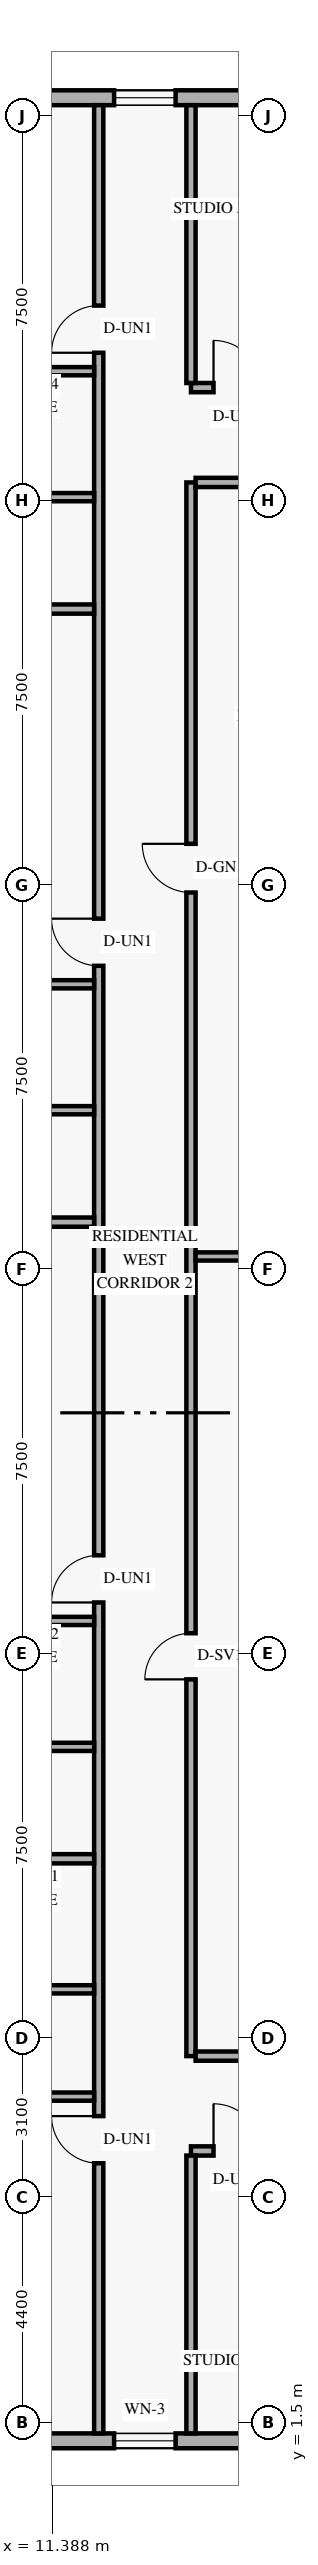
"""IFC4 building model, lengths in metres.
Left out: names, types, materials, properties, quantities, classifications, styles, units other than length and angle.
Written with IfcOpenShell. Run it as: python <this file> out.ifc"""

import sys

from ifc_helpers import new_model, si_unit, direction, frame, frame_2d, origin, place, context, subcontext, project, spatial, rectangle, extrude, element, fill, save


model = new_model("IFC4")
c1 = context("Model", 3, precision=1e-05, world=origin(), true_north=direction((0.0, 1.0)))
c2 = subcontext(c1, "Body", "Model", "MODEL_VIEW")
j1 = project(units=[si_unit("LENGTHUNIT", "METRE"), si_unit("PLANEANGLEUNIT", "RADIAN")], contexts=[c1])
p1 = place(None, origin())
s1 = spatial("IfcSite", under=j1, at=p1, CompositionType="ELEMENT")
p2 = place(p1, origin())
s2 = spatial("IfcBuilding", under=s1, at=p2, CompositionType="ELEMENT")
p3 = place(p2, frame((0.0, 0.0, 49.2)))
s3 = spatial("IfcBuildingStorey", under=s2, at=p3, CompositionType="ELEMENT", Elevation=49.2)
p4 = place(p3, frame((5.42, 1.145, 0.0), z_axis=(0.0, 0.0, 1.0), x_axis=(1.0, 0.0, 0.0)))
e1 = element("IfcWall", 1, at=p4, inside=s3, PredefinedType="SOLIDWALL", context=c2, shape_type="SweptSolid", body=[
    extrude(rectangle(XDim=39.56, YDim=0.29, at=frame_2d((19.78, 0.0))), origin(), (0.0, 0.0, 1.0), 3.36),
])
p5 = place(p4, frame((2.615, 0.0, 0.85)))
e2 = element("IfcOpeningElement", 2, at=p5, cuts=e1, PredefinedType="OPENING", context=c2, shape_type="SweptSolid", body=[
    extrude(rectangle(XDim=1.65, YDim=1.6, at=frame_2d((0.825, 0.8))), frame((0.0, 0.155, 0.0), z_axis=(0.0, -1.0, 0.0), x_axis=(1.0, 0.0, 0.0)), (0.0, 0.0, 1.0), 0.31),
])
p6 = place(p4, frame((7.18, 0.0, 0.85)))
e3 = element("IfcOpeningElement", 3, at=p6, cuts=e1, PredefinedType="OPENING", context=c2, shape_type="SweptSolid", body=[
    extrude(rectangle(XDim=1.2, YDim=1.5, at=frame_2d((0.6, 0.75))), frame((0.0, 0.155, 0.0), z_axis=(0.0, -1.0, 0.0), x_axis=(1.0, 0.0, 0.0)), (0.0, 0.0, 1.0), 0.31),
])
p7 = place(p4, frame((11.906, 0.0, 0.85)))
e4 = element("IfcOpeningElement", 4, at=p7, cuts=e1, PredefinedType="OPENING", context=c2, shape_type="SweptSolid", body=[
    extrude(rectangle(XDim=1.65, YDim=1.6, at=frame_2d((0.825, 0.8))), frame((0.0, 0.155, 0.0), z_axis=(0.0, -1.0, 0.0), x_axis=(1.0, 0.0, 0.0)), (0.0, 0.0, 1.0), 0.31),
])
p8 = place(p4, frame((18.515, 0.0, 0.85)))
e5 = element("IfcOpeningElement", 5, at=p8, cuts=e1, PredefinedType="OPENING", context=c2, shape_type="SweptSolid", body=[
    extrude(rectangle(XDim=1.65, YDim=1.6, at=frame_2d((0.825, 0.8))), frame((0.0, 0.155, 0.0), z_axis=(0.0, -1.0, 0.0), x_axis=(1.0, 0.0, 0.0)), (0.0, 0.0, 1.0), 0.31),
])
p9 = place(p4, frame((25.124, 0.0, 0.85)))
e6 = element("IfcOpeningElement", 6, at=p9, cuts=e1, PredefinedType="OPENING", context=c2, shape_type="SweptSolid", body=[
    extrude(rectangle(XDim=1.65, YDim=1.6, at=frame_2d((0.825, 0.8))), frame((0.0, 0.155, 0.0), z_axis=(0.0, -1.0, 0.0), x_axis=(1.0, 0.0, 0.0)), (0.0, 0.0, 1.0), 0.31),
])
p10 = place(p4, frame((30.465, 0.0, 0.85)))
e7 = element("IfcOpeningElement", 7, at=p10, cuts=e1, PredefinedType="OPENING", context=c2, shape_type="SweptSolid", body=[
    extrude(rectangle(XDim=1.2, YDim=1.5, at=frame_2d((0.6, 0.75))), frame((0.0, 0.155, 0.0), z_axis=(0.0, -1.0, 0.0), x_axis=(1.0, 0.0, 0.0)), (0.0, 0.0, 1.0), 0.31),
])
p11 = place(p4, frame((32.613, 0.0, 0.85)))
e8 = element("IfcOpeningElement", 8, at=p11, cuts=e1, PredefinedType="OPENING", context=c2, shape_type="SweptSolid", body=[
    extrude(rectangle(XDim=1.65, YDim=1.6, at=frame_2d((0.825, 0.8))), frame((0.0, 0.155, 0.0), z_axis=(0.0, -1.0, 0.0), x_axis=(1.0, 0.0, 0.0)), (0.0, 0.0, 1.0), 0.31),
])
p12 = place(p4, frame((36.328, 0.0, 0.85)))
e9 = element("IfcOpeningElement", 9, at=p12, cuts=e1, PredefinedType="OPENING", context=c2, shape_type="SweptSolid", body=[
    extrude(rectangle(XDim=1.65, YDim=1.6, at=frame_2d((0.825, 0.8))), frame((0.0, 0.155, 0.0), z_axis=(0.0, -1.0, 0.0), x_axis=(1.0, 0.0, 0.0)), (0.0, 0.0, 1.0), 0.31),
])
p13 = place(p3, frame((44.98, 46.855, 0.0), z_axis=(0.0, 0.0, 1.0), x_axis=(-1.0, 0.0, 0.0)))
e10 = element("IfcWall", 10, at=p13, inside=s3, PredefinedType="SOLIDWALL", context=c2, shape_type="SweptSolid", body=[
    extrude(rectangle(XDim=39.56, YDim=0.29, at=frame_2d((19.78, 0.0))), origin(), (0.0, 0.0, 1.0), 3.36),
])
p14 = place(p13, frame((35.295, 0.0, 0.85)))
e11 = element("IfcOpeningElement", 11, at=p14, cuts=e10, PredefinedType="OPENING", context=c2, shape_type="SweptSolid", body=[
    extrude(rectangle(XDim=1.65, YDim=1.6, at=frame_2d((0.825, 0.8))), frame((0.0, 0.155, 0.0), z_axis=(0.0, -1.0, 0.0), x_axis=(1.0, 0.0, 0.0)), (0.0, 0.0, 1.0), 0.31),
])
p15 = place(p13, frame((31.18, 0.0, 0.85)))
e12 = element("IfcOpeningElement", 12, at=p15, cuts=e10, PredefinedType="OPENING", context=c2, shape_type="SweptSolid", body=[
    extrude(rectangle(XDim=1.2, YDim=1.5, at=frame_2d((0.6, 0.75))), frame((0.0, 0.155, 0.0), z_axis=(0.0, -1.0, 0.0), x_axis=(1.0, 0.0, 0.0)), (0.0, 0.0, 1.0), 0.31),
])
p16 = place(p13, frame((25.684, 0.0, 0.85)))
e13 = element("IfcOpeningElement", 13, at=p16, cuts=e10, PredefinedType="OPENING", context=c2, shape_type="SweptSolid", body=[
    extrude(rectangle(XDim=1.65, YDim=1.6, at=frame_2d((0.825, 0.8))), frame((0.0, 0.155, 0.0), z_axis=(0.0, -1.0, 0.0), x_axis=(1.0, 0.0, 0.0)), (0.0, 0.0, 1.0), 0.31),
])
p17 = place(p13, frame((18.649, 0.0, 0.85)))
e14 = element("IfcOpeningElement", 14, at=p17, cuts=e10, PredefinedType="OPENING", context=c2, shape_type="SweptSolid", body=[
    extrude(rectangle(XDim=1.65, YDim=1.6, at=frame_2d((0.825, 0.8))), frame((0.0, 0.155, 0.0), z_axis=(0.0, -1.0, 0.0), x_axis=(1.0, 0.0, 0.0)), (0.0, 0.0, 1.0), 0.31),
])
p18 = place(p13, frame((12.359, 0.0, 0.85)))
e15 = element("IfcOpeningElement", 15, at=p18, cuts=e10, PredefinedType="OPENING", context=c2, shape_type="SweptSolid", body=[
    extrude(rectangle(XDim=1.65, YDim=1.6, at=frame_2d((0.825, 0.8))), frame((0.0, 0.155, 0.0), z_axis=(0.0, -1.0, 0.0), x_axis=(1.0, 0.0, 0.0)), (0.0, 0.0, 1.0), 0.31),
])
p19 = place(p13, frame((7.895, 0.0, 0.85)))
e16 = element("IfcOpeningElement", 16, at=p19, cuts=e10, PredefinedType="OPENING", context=c2, shape_type="SweptSolid", body=[
    extrude(rectangle(XDim=1.2, YDim=1.5, at=frame_2d((0.6, 0.75))), frame((0.0, 0.155, 0.0), z_axis=(0.0, -1.0, 0.0), x_axis=(1.0, 0.0, 0.0)), (0.0, 0.0, 1.0), 0.31),
])
p20 = place(p13, frame((5.183, 0.0, 0.85)))
e17 = element("IfcOpeningElement", 17, at=p20, cuts=e10, PredefinedType="OPENING", context=c2, shape_type="SweptSolid", body=[
    extrude(rectangle(XDim=1.65, YDim=1.6, at=frame_2d((0.825, 0.8))), frame((0.0, 0.155, 0.0), z_axis=(0.0, -1.0, 0.0), x_axis=(1.0, 0.0, 0.0)), (0.0, 0.0, 1.0), 0.31),
])
p21 = place(p13, frame((1.468, 0.0, 0.85)))
e18 = element("IfcOpeningElement", 18, at=p21, cuts=e10, PredefinedType="OPENING", context=c2, shape_type="SweptSolid", body=[
    extrude(rectangle(XDim=1.65, YDim=1.6, at=frame_2d((0.825, 0.8))), frame((0.0, 0.155, 0.0), z_axis=(0.0, -1.0, 0.0), x_axis=(1.0, 0.0, 0.0)), (0.0, 0.0, 1.0), 0.31),
])
p22 = place(p3, frame((14.1, 6.8, 0.0), z_axis=(0.0, 0.0, 1.0), x_axis=(1.0, 0.0, 0.0)))
e19 = element("IfcWall", 19, at=p22, inside=s3, PredefinedType="STANDARD", context=c2, shape_type="SweptSolid", body=[
    extrude(rectangle(XDim=21.32, YDim=0.18, at=frame_2d((10.66, 0.0))), origin(), (0.0, 0.0, 1.0), 2.649),
])
p23 = place(p22, frame((0.44, 0.0, 0.0)))
e20 = element("IfcOpeningElement", 20, at=p23, cuts=e19, PredefinedType="OPENING", context=c2, shape_type="SweptSolid", body=[
    extrude(rectangle(XDim=0.92, YDim=2.15, at=frame_2d((0.46, 1.075))), frame((0.0, 0.1, 0.0), z_axis=(0.0, -1.0, 0.0), x_axis=(1.0, 0.0, 0.0)), (0.0, 0.0, 1.0), 0.2),
])
p24 = place(p22, frame((8.582, 0.0, 0.0)))
e21 = element("IfcOpeningElement", 21, at=p24, cuts=e19, PredefinedType="OPENING", context=c2, shape_type="SweptSolid", body=[
    extrude(rectangle(XDim=0.95, YDim=2.15, at=frame_2d((0.475, 1.075))), frame((0.0, 0.1, 0.0), z_axis=(0.0, -1.0, 0.0), x_axis=(1.0, 0.0, 0.0)), (0.0, 0.0, 1.0), 0.2),
])
p25 = place(p22, frame((13.658, 0.0, 0.0)))
e22 = element("IfcOpeningElement", 22, at=p25, cuts=e19, PredefinedType="OPENING", context=c2, shape_type="SweptSolid", body=[
    extrude(rectangle(XDim=0.92, YDim=2.15, at=frame_2d((0.46, 1.075))), frame((0.0, 0.1, 0.0), z_axis=(0.0, -1.0, 0.0), x_axis=(1.0, 0.0, 0.0)), (0.0, 0.0, 1.0), 0.2),
])
p26 = place(p3, frame((14.1, 41.2, 0.0), z_axis=(0.0, 0.0, 1.0), x_axis=(1.0, 0.0, 0.0)))
e23 = element("IfcWall", 23, at=p26, inside=s3, PredefinedType="STANDARD", context=c2, shape_type="SweptSolid", body=[
    extrude(rectangle(XDim=21.32, YDim=0.18, at=frame_2d((10.66, 0.0))), origin(), (0.0, 0.0, 1.0), 2.649),
])
p27 = place(p26, frame((0.44, 0.0, 0.0)))
e24 = element("IfcOpeningElement", 24, at=p27, cuts=e23, PredefinedType="OPENING", context=c2, shape_type="SweptSolid", body=[
    extrude(rectangle(XDim=0.92, YDim=2.15, at=frame_2d((0.46, 1.075))), frame((0.0, 0.1, 0.0), z_axis=(0.0, -1.0, 0.0), x_axis=(1.0, 0.0, 0.0)), (0.0, 0.0, 1.0), 0.2),
])
p28 = place(p26, frame((10.631, 0.0, 0.0)))
e25 = element("IfcOpeningElement", 25, at=p28, cuts=e23, PredefinedType="OPENING", context=c2, shape_type="SweptSolid", body=[
    extrude(rectangle(XDim=0.95, YDim=2.15, at=frame_2d((0.475, 1.075))), frame((0.0, 0.1, 0.0), z_axis=(0.0, -1.0, 0.0), x_axis=(1.0, 0.0, 0.0)), (0.0, 0.0, 1.0), 0.2),
])
p29 = place(p26, frame((14.511, 0.0, 0.0)))
e26 = element("IfcOpeningElement", 26, at=p29, cuts=e23, PredefinedType="OPENING", context=c2, shape_type="SweptSolid", body=[
    extrude(rectangle(XDim=0.92, YDim=2.15, at=frame_2d((0.46, 1.075))), frame((0.0, 0.1, 0.0), z_axis=(0.0, -1.0, 0.0), x_axis=(1.0, 0.0, 0.0)), (0.0, 0.0, 1.0), 0.2),
])
p30 = place(p3, frame((12.3, 1.29, 0.0), z_axis=(0.0, 0.0, 1.0), x_axis=(0.0, 1.0, 0.0)))
e27 = element("IfcWall", 27, at=p30, inside=s3, PredefinedType="STANDARD", context=c2, shape_type="SweptSolid", body=[
    extrude(rectangle(XDim=45.42, YDim=0.18, at=frame_2d((22.71, 0.0))), origin(), (0.0, 0.0, 1.0), 2.649),
])
p31 = place(p30, frame((5.27, 0.0, 0.0)))
e28 = element("IfcOpeningElement", 28, at=p31, cuts=e27, PredefinedType="OPENING", context=c2, shape_type="SweptSolid", body=[
    extrude(rectangle(XDim=0.92, YDim=2.15, at=frame_2d((0.46, 1.075))), frame((0.0, 0.1, 0.0), z_axis=(0.0, -1.0, 0.0), x_axis=(1.0, 0.0, 0.0)), (0.0, 0.0, 1.0), 0.2),
])
p32 = place(p30, frame((16.21, 0.0, 0.0)))
e29 = element("IfcOpeningElement", 29, at=p32, cuts=e27, PredefinedType="OPENING", context=c2, shape_type="SweptSolid", body=[
    extrude(rectangle(XDim=0.92, YDim=2.15, at=frame_2d((0.46, 1.075))), frame((0.0, 0.1, 0.0), z_axis=(0.0, -1.0, 0.0), x_axis=(1.0, 0.0, 0.0)), (0.0, 0.0, 1.0), 0.2),
])
p33 = place(p30, frame((28.63, 0.0, 0.0)))
e30 = element("IfcOpeningElement", 30, at=p33, cuts=e27, PredefinedType="OPENING", context=c2, shape_type="SweptSolid", body=[
    extrude(rectangle(XDim=0.92, YDim=2.15, at=frame_2d((0.46, 1.075))), frame((0.0, 0.1, 0.0), z_axis=(0.0, -1.0, 0.0), x_axis=(1.0, 0.0, 0.0)), (0.0, 0.0, 1.0), 0.2),
])
p34 = place(p30, frame((40.59, 0.0, 0.0)))
e31 = element("IfcOpeningElement", 31, at=p34, cuts=e27, PredefinedType="OPENING", context=c2, shape_type="SweptSolid", body=[
    extrude(rectangle(XDim=0.92, YDim=2.15, at=frame_2d((0.46, 1.075))), frame((0.0, 0.1, 0.0), z_axis=(0.0, -1.0, 0.0), x_axis=(1.0, 0.0, 0.0)), (0.0, 0.0, 1.0), 0.2),
])
p35 = place(p3, frame((14.1, 8.65, 0.0), z_axis=(0.0, 0.0, 1.0), x_axis=(0.0, 1.0, 0.0)))
e32 = element("IfcWall", 32, at=p35, inside=s3, PredefinedType="STANDARD", context=c2, shape_type="SweptSolid", body=[
    extrude(rectangle(XDim=30.7, YDim=0.18, at=frame_2d((15.35, 0.0))), origin(), (0.0, 0.0, 1.0), 2.649),
])
p36 = place(p35, frame((7.35, 0.0, 0.0)))
e33 = element("IfcOpeningElement", 33, at=p36, cuts=e32, PredefinedType="OPENING", context=c2, shape_type="SweptSolid", body=[
    extrude(rectangle(XDim=0.9, YDim=2.1, at=frame_2d((0.45, 1.05))), frame((0.0, 0.1, 0.0), z_axis=(0.0, -1.0, 0.0), x_axis=(1.0, 0.0, 0.0)), (0.0, 0.0, 1.0), 0.2),
])
p37 = place(p35, frame((22.7, 0.0, 0.0)))
e34 = element("IfcOpeningElement", 34, at=p37, cuts=e32, PredefinedType="OPENING", context=c2, shape_type="SweptSolid", body=[
    extrude(rectangle(XDim=0.95, YDim=2.15, at=frame_2d((0.475, 1.075))), frame((0.0, 0.1, 0.0), z_axis=(0.0, -1.0, 0.0), x_axis=(1.0, 0.0, 0.0)), (0.0, 0.0, 1.0), 0.2),
])
for number, where, z_axis, x_axis in (
    (35, (14.19, 8.65, 0.0), (0.0, 0.0, 1.0), (1.0, 0.0, 0.0)),
    (36, (14.19, 39.35, 0.0), (0.0, 0.0, 1.0), (1.0, 0.0, 0.0)),
):
    element("IfcWall", number, at=place(p3, frame(where, z_axis=z_axis, x_axis=x_axis)), inside=s3, PredefinedType="STANDARD", context=c2, shape_type="SweptSolid", body=[
        extrude(rectangle(XDim=7.37, YDim=0.18, at=frame_2d((3.685, 0.0))), origin(), (0.0, 0.0, 1.0), 2.649),
    ])
for number, where, z_axis, x_axis in (
    (37, (14.1, 1.29, 0.0), (0.0, 0.0, 1.0), (0.0, 1.0, 0.0)),
    (38, (14.1, 41.29, 0.0), (0.0, 0.0, 1.0), (0.0, 1.0, 0.0)),
):
    element("IfcWall", number, at=place(p3, frame(where, z_axis=z_axis, x_axis=x_axis)), inside=s3, PredefinedType="PARTITIONING", context=c2, shape_type="SweptSolid", body=[
        extrude(rectangle(XDim=5.42, YDim=0.18, at=frame_2d((2.71, 0.0))), origin(), (0.0, 0.0, 1.0), 2.809),
    ])
p38 = place(p3, frame((8.43, 7.86, 0.0), z_axis=(0.0, 0.0, 1.0), x_axis=(1.0, 0.0, 0.0)))
e39 = element("IfcWall", 39, at=p38, inside=s3, PredefinedType="PLUMBINGWALL", context=c2, shape_type="SweptSolid", body=[
    extrude(rectangle(XDim=3.78, YDim=0.16, at=frame_2d((1.89, 0.0))), origin(), (0.0, 0.0, 1.0), 2.649),
])
p39 = place(p3, frame((8.59, 9.953, 0.0), z_axis=(0.0, 0.0, 1.0), x_axis=(1.0, 0.0, 0.0)))
e40 = element("IfcWall", 40, at=p39, inside=s3, PredefinedType="PLUMBINGWALL", context=c2, shape_type="SweptSolid", body=[
    extrude(rectangle(XDim=3.62, YDim=0.16, at=frame_2d((1.81, 0.0))), origin(), (0.0, 0.0, 1.0), 2.649),
])
p40 = place(p3, frame((2.09, 12.5, 0.0), z_axis=(0.0, 0.0, 1.0), x_axis=(1.0, 0.0, 0.0)))
e41 = element("IfcWall", 41, at=p40, inside=s3, PredefinedType="PARTITIONING", context=c2, shape_type="SweptSolid", body=[
    extrude(rectangle(XDim=10.12, YDim=0.18, at=frame_2d((5.06, 0.0))), origin(), (0.0, 0.0, 1.0), 2.649),
])
p41 = place(p3, frame((8.43, 17.14, 0.0), z_axis=(0.0, 0.0, 1.0), x_axis=(1.0, 0.0, 0.0)))
e42 = element("IfcWall", 42, at=p41, inside=s3, PredefinedType="PLUMBINGWALL", context=c2, shape_type="SweptSolid", body=[
    extrude(rectangle(XDim=3.78, YDim=0.16, at=frame_2d((1.89, 0.0))), origin(), (0.0, 0.0, 1.0), 2.649),
])
p42 = place(p3, frame((8.59, 14.683, 0.0), z_axis=(0.0, 0.0, 1.0), x_axis=(1.0, 0.0, 0.0)))
e43 = element("IfcWall", 43, at=p42, inside=s3, PredefinedType="PLUMBINGWALL", context=c2, shape_type="SweptSolid", body=[
    extrude(rectangle(XDim=3.62, YDim=0.16, at=frame_2d((1.81, 0.0))), origin(), (0.0, 0.0, 1.0), 2.649),
])
p43 = place(p3, frame((2.09, 24.92, 0.0), z_axis=(0.0, 0.0, 1.0), x_axis=(1.0, 0.0, 0.0)))
e44 = element("IfcWall", 44, at=p43, inside=s3, PredefinedType="PARTITIONING", context=c2, shape_type="SweptSolid", body=[
    extrude(rectangle(XDim=10.12, YDim=0.18, at=frame_2d((5.06, 0.0))), origin(), (0.0, 0.0, 1.0), 2.649),
])
p44 = place(p3, frame((9.528, 29.56, 0.0), z_axis=(0.0, 0.0, 1.0), x_axis=(1.0, 0.0, 0.0)))
e45 = element("IfcWall", 45, at=p44, inside=s3, PredefinedType="PLUMBINGWALL", context=c2, shape_type="SweptSolid", body=[
    extrude(rectangle(XDim=2.682, YDim=0.16, at=frame_2d((1.341, 0.0))), origin(), (0.0, 0.0, 1.0), 2.649),
])
p45 = place(p3, frame((9.688, 27.103, 0.0), z_axis=(0.0, 0.0, 1.0), x_axis=(1.0, 0.0, 0.0)))
e46 = element("IfcWall", 46, at=p45, inside=s3, PredefinedType="PLUMBINGWALL", context=c2, shape_type="SweptSolid", body=[
    extrude(rectangle(XDim=2.522, YDim=0.16, at=frame_2d((1.261, 0.0))), origin(), (0.0, 0.0, 1.0), 2.649),
])
p46 = place(p3, frame((2.09, 36.88, 0.0), z_axis=(0.0, 0.0, 1.0), x_axis=(1.0, 0.0, 0.0)))
e47 = element("IfcWall", 47, at=p46, inside=s3, PredefinedType="PARTITIONING", context=c2, shape_type="SweptSolid", body=[
    extrude(rectangle(XDim=10.12, YDim=0.18, at=frame_2d((5.06, 0.0))), origin(), (0.0, 0.0, 1.0), 2.649),
])
p47 = place(p3, frame((8.43, 41.52, 0.0), z_axis=(0.0, 0.0, 1.0), x_axis=(1.0, 0.0, 0.0)))
e48 = element("IfcWall", 48, at=p47, inside=s3, PredefinedType="PLUMBINGWALL", context=c2, shape_type="SweptSolid", body=[
    extrude(rectangle(XDim=3.78, YDim=0.16, at=frame_2d((1.89, 0.0))), origin(), (0.0, 0.0, 1.0), 3.36),
])
p48 = place(p3, frame((8.59, 39.063, 0.0), z_axis=(0.0, 0.0, 1.0), x_axis=(1.0, 0.0, 0.0)))
e49 = element("IfcWall", 49, at=p48, inside=s3, PredefinedType="PLUMBINGWALL", context=c2, shape_type="SweptSolid", body=[
    extrude(rectangle(XDim=3.62, YDim=0.16, at=frame_2d((1.81, 0.0))), origin(), (0.0, 0.0, 1.0), 3.36),
])
p49 = place(p3, frame((14.19, 24.25, 0.0), z_axis=(0.0, 0.0, 1.0), x_axis=(1.0, 0.0, 0.0)))
e50 = element("IfcWall", 50, at=p49, inside=s3, PredefinedType="PARTITIONING", context=c2, shape_type="SweptSolid", body=[
    extrude(rectangle(XDim=7.37, YDim=0.16, at=frame_2d((3.685, 0.0))), origin(), (0.0, 0.0, 1.0), 2.649),
])
p50 = place(p6, origin())
e51 = element("IfcWindow", 51, at=p50, inside=s3, PartitioningType="SINGLE_PANEL", PredefinedType="WINDOW", context=c2, shape_type="SweptSolid", body=[
    extrude(rectangle(XDim=1.2, YDim=1.5, at=frame_2d((0.6, 0.75))), frame((0.0, 0.03, 0.0), z_axis=(0.0, -1.0, 0.0), x_axis=(1.0, 0.0, 0.0)), (0.0, 0.0, 1.0), 0.06),
])
fill(e3, e51)
p51 = place(p15, origin())
e52 = element("IfcWindow", 52, at=p51, inside=s3, PartitioningType="SINGLE_PANEL", PredefinedType="WINDOW", context=c2, shape_type="SweptSolid", body=[
    extrude(rectangle(XDim=1.2, YDim=1.5, at=frame_2d((0.6, 0.75))), frame((0.0, 0.03, 0.0), z_axis=(0.0, -1.0, 0.0), x_axis=(1.0, 0.0, 0.0)), (0.0, 0.0, 1.0), 0.06),
])
fill(e12, e52)
p52 = place(p31, origin())
e53 = element("IfcDoor", 53, at=p52, inside=s3, OperationType="SINGLE_SWING_RIGHT", PredefinedType="DOOR", context=c2, shape_type="SweptSolid", body=[
    extrude(rectangle(XDim=0.92, YDim=2.15, at=frame_2d((0.46, 1.075))), frame((0.0, 0.025, 0.0), z_axis=(0.0, -1.0, 0.0), x_axis=(1.0, 0.0, 0.0)), (0.0, 0.0, 1.0), 0.05),
])
fill(e28, e53)
p53 = place(p32, origin())
e54 = element("IfcDoor", 54, at=p53, inside=s3, OperationType="SINGLE_SWING_LEFT", PredefinedType="DOOR", context=c2, shape_type="SweptSolid", body=[
    extrude(rectangle(XDim=0.92, YDim=2.15, at=frame_2d((0.46, 1.075))), frame((0.0, 0.025, 0.0), z_axis=(0.0, -1.0, 0.0), x_axis=(1.0, 0.0, 0.0)), (0.0, 0.0, 1.0), 0.05),
])
fill(e29, e54)
p54 = place(p33, origin())
e55 = element("IfcDoor", 55, at=p54, inside=s3, OperationType="SINGLE_SWING_RIGHT", PredefinedType="DOOR", context=c2, shape_type="SweptSolid", body=[
    extrude(rectangle(XDim=0.92, YDim=2.15, at=frame_2d((0.46, 1.075))), frame((0.0, 0.025, 0.0), z_axis=(0.0, -1.0, 0.0), x_axis=(1.0, 0.0, 0.0)), (0.0, 0.0, 1.0), 0.05),
])
fill(e30, e55)
p55 = place(p34, origin())
e56 = element("IfcDoor", 56, at=p55, inside=s3, OperationType="SINGLE_SWING_LEFT", PredefinedType="DOOR", context=c2, shape_type="SweptSolid", body=[
    extrude(rectangle(XDim=0.92, YDim=2.15, at=frame_2d((0.46, 1.075))), frame((0.0, 0.025, 0.0), z_axis=(0.0, -1.0, 0.0), x_axis=(1.0, 0.0, 0.0)), (0.0, 0.0, 1.0), 0.05),
])
fill(e31, e56)
p56 = place(p36, origin())
e57 = element("IfcDoor", 57, at=p56, inside=s3, OperationType="SINGLE_SWING_LEFT", PredefinedType="DOOR", context=c2, shape_type="SweptSolid", body=[
    extrude(rectangle(XDim=0.9, YDim=2.1, at=frame_2d((0.45, 1.05))), frame((0.0, 0.025, 0.0), z_axis=(0.0, -1.0, 0.0), x_axis=(1.0, 0.0, 0.0)), (0.0, 0.0, 1.0), 0.05),
])
fill(e33, e57)
p57 = place(p37, origin())
e58 = element("IfcDoor", 58, at=p57, inside=s3, OperationType="SINGLE_SWING_RIGHT", PredefinedType="DOOR", context=c2, shape_type="SweptSolid", body=[
    extrude(rectangle(XDim=0.95, YDim=2.15, at=frame_2d((0.475, 1.075))), frame((0.0, 0.025, 0.0), z_axis=(0.0, -1.0, 0.0), x_axis=(1.0, 0.0, 0.0)), (0.0, 0.0, 1.0), 0.05),
])
fill(e34, e58)
p58 = place(p23, origin())
e59 = element("IfcDoor", 59, at=p58, inside=s3, OperationType="SINGLE_SWING_LEFT", PredefinedType="DOOR", context=c2, shape_type="SweptSolid", body=[
    extrude(rectangle(XDim=0.92, YDim=2.15, at=frame_2d((0.46, 1.075))), frame((0.0, 0.025, 0.0), z_axis=(0.0, -1.0, 0.0), x_axis=(1.0, 0.0, 0.0)), (0.0, 0.0, 1.0), 0.05),
])
fill(e20, e59)
p59 = place(p27, origin())
e60 = element("IfcDoor", 60, at=p59, inside=s3, OperationType="SINGLE_SWING_LEFT", PredefinedType="DOOR", context=c2, shape_type="SweptSolid", body=[
    extrude(rectangle(XDim=0.92, YDim=2.15, at=frame_2d((0.46, 1.075))), frame((0.0, 0.025, 0.0), z_axis=(0.0, -1.0, 0.0), x_axis=(1.0, 0.0, 0.0)), (0.0, 0.0, 1.0), 0.05),
])
fill(e24, e60)
save(model, sys.argv[1])
